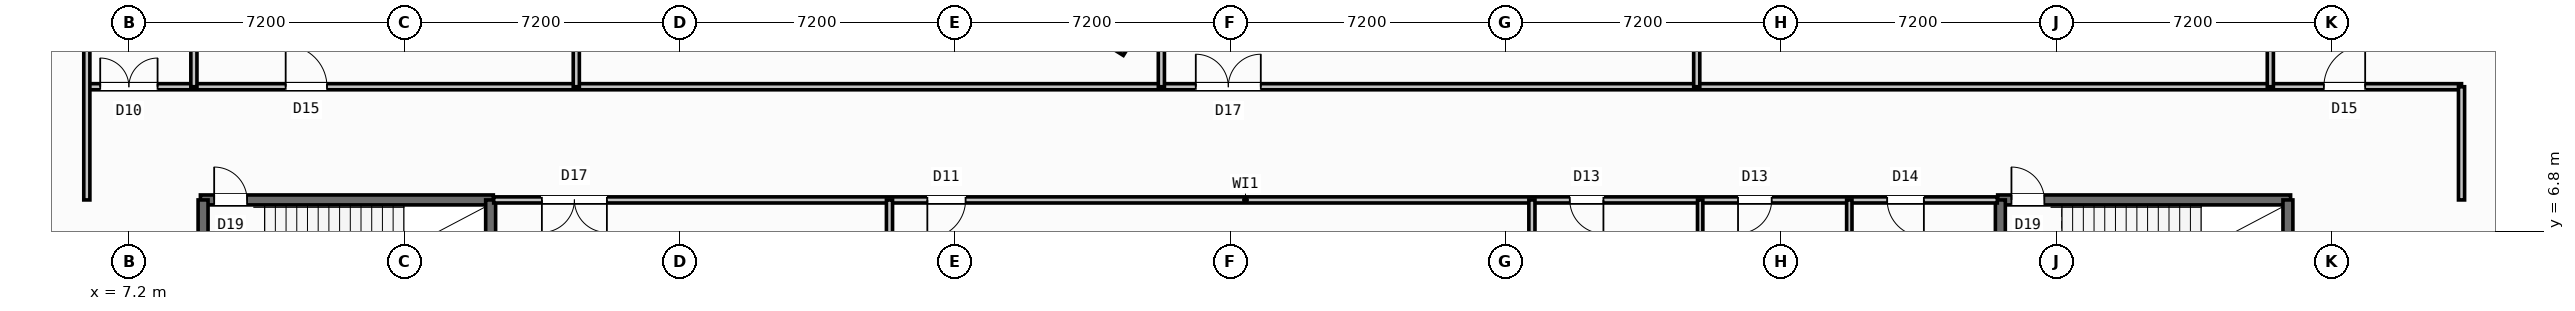
"""IFC4 building model, lengths in metres.
Left out: names, types, materials, properties, quantities, classifications, styles, units other than length and angle.
Written with IfcOpenShell. Run it as: python <this file> out.ifc"""

import sys

from ifc_helpers import new_model, si_unit, direction, frame, frame_2d, origin, origin_2d, place, context, subcontext, project, spatial, rectangle, hollow_rectangle, extrude, source, transform, mapped, element, fill, save


model = new_model("IFC4")
c1 = context("Model", 3, precision=1e-05, world=origin(), true_north=direction((0.0, 1.0)))
c2 = subcontext(c1, "Body", "Model", "MODEL_VIEW")
j1 = project(units=[si_unit("LENGTHUNIT", "METRE"), si_unit("PLANEANGLEUNIT", "RADIAN")], contexts=[c1])
p1 = place(None, origin())
s1 = spatial("IfcSite", under=j1, at=p1, CompositionType="ELEMENT")
p2 = place(p1, origin())
s2 = spatial("IfcBuilding", under=s1, at=p2, CompositionType="ELEMENT")
p3 = place(p2, frame((0.0, 0.0, 5.4)))
s3 = spatial("IfcBuildingStorey", under=s2, at=p3, CompositionType="ELEMENT", Elevation=5.4)
m1 = source(origin(), c2, "Body", "SweptSolid", [
    extrude(hollow_rectangle(XDim=1.0, YDim=1.0, WallThickness=0.04, at=origin_2d()), origin(), (0.0, 0.0, 1.0), 4.8),
])
p4 = place(p3, frame((33.046, 12.087, 0.0), z_axis=(0.0, 0.0, 1.0), x_axis=(-0.848048096156, 0.529919264233, 0.0)))
e1 = element("IfcColumn", 1, at=p4, inside=s3, PredefinedType="COLUMN", context=c2, shape_type="MappedRepresentation", body=[
    mapped(m1, transform((0.0, 0.0, 0.0), scale=1.0)),
])
p5 = place(p3, frame((9.07, 7.62, 0.0), z_axis=(0.0, 0.0, 1.0), x_axis=(1.0, 0.0, 0.0)))
e2 = element("IfcWall", 2, at=p5, inside=s3, PredefinedType="SHEAR", context=c2, shape_type="SweptSolid", body=[
    extrude(rectangle(XDim=7.66, YDim=0.26, at=frame_2d((3.83, 0.0))), origin(), (0.0, 0.0, 1.0), 4.6),
])
p6 = place(p5, frame((0.36, 0.0, 0.0)))
e3 = element("IfcOpeningElement", 3, at=p6, cuts=e2, PredefinedType="OPENING", context=c2, shape_type="SweptSolid", body=[
    extrude(rectangle(XDim=0.86, YDim=2.05, at=frame_2d((0.43, 1.025))), frame((0.0, 0.14, 0.0), z_axis=(0.0, -1.0, 0.0), x_axis=(1.0, 0.0, 0.0)), (0.0, 0.0, 1.0), 0.28),
])
for number, where, z_axis, x_axis in (
    (4, (9.14, 4.26, 0.0), (0.0, 0.0, 1.0), (0.0, 1.0, 0.0)),
    (5, (16.66, 4.26, 0.0), (0.0, 0.0, 1.0), (0.0, 1.0, 0.0)),
):
    element("IfcWall", number, at=place(p3, frame(where, z_axis=z_axis, x_axis=x_axis)), inside=s3, PredefinedType="SHEAR", context=c2, shape_type="SweptSolid", body=[
        extrude(rectangle(XDim=3.36, YDim=0.26, at=frame_2d((1.68, 0.0))), origin(), (0.0, 0.0, 1.0), 4.6),
    ])
p7 = place(p3, frame((56.07, 7.62, 0.0), z_axis=(0.0, 0.0, 1.0), x_axis=(1.0, 0.0, 0.0)))
e6 = element("IfcWall", 6, at=p7, inside=s3, PredefinedType="SHEAR", context=c2, shape_type="SweptSolid", body=[
    extrude(rectangle(XDim=7.66, YDim=0.26, at=frame_2d((3.83, 0.0))), origin(), (0.0, 0.0, 1.0), 4.6),
])
p8 = place(p7, frame((0.36, 0.0, 0.0)))
e7 = element("IfcOpeningElement", 7, at=p8, cuts=e6, PredefinedType="OPENING", context=c2, shape_type="SweptSolid", body=[
    extrude(rectangle(XDim=0.86, YDim=2.05, at=frame_2d((0.43, 1.025))), frame((0.0, 0.14, 0.0), z_axis=(0.0, -1.0, 0.0), x_axis=(1.0, 0.0, 0.0)), (0.0, 0.0, 1.0), 0.28),
])
for number, where, z_axis, x_axis in (
    (8, (56.14, 4.26, 0.0), (0.0, 0.0, 1.0), (0.0, 1.0, 0.0)),
    (9, (63.66, 4.26, 0.0), (0.0, 0.0, 1.0), (0.0, 1.0, 0.0)),
):
    element("IfcWall", number, at=place(p3, frame(where, z_axis=z_axis, x_axis=x_axis)), inside=s3, PredefinedType="SHEAR", context=c2, shape_type="SweptSolid", body=[
        extrude(rectangle(XDim=3.36, YDim=0.26, at=frame_2d((1.68, 0.0))), origin(), (0.0, 0.0, 1.0), 4.6),
    ])
p9 = place(p3, frame((6.1, 10.58, 0.0), z_axis=(0.0, 0.0, 1.0), x_axis=(1.0, 0.0, 0.0)))
e10 = element("IfcWall", 10, at=p9, inside=s3, PredefinedType="PARTITIONING", context=c2, shape_type="SweptSolid", body=[
    extrude(rectangle(XDim=62.1, YDim=0.16, at=frame_2d((31.05, 0.0))), origin(), (0.0, 0.0, 1.0), 4.44),
])
p10 = place(p9, frame((29.0, 0.0, 0.0)))
e11 = element("IfcOpeningElement", 11, at=p10, cuts=e10, PredefinedType="OPENING", context=c2, shape_type="SweptSolid", body=[
    extrude(rectangle(XDim=1.7, YDim=2.2, at=frame_2d((0.85, 1.1))), frame((0.0, 0.09, 0.0), z_axis=(0.0, -1.0, 0.0), x_axis=(1.0, 0.0, 0.0)), (0.0, 0.0, 1.0), 0.18),
])
p11 = place(p9, frame((0.35, 0.0, 0.0)))
e12 = element("IfcOpeningElement", 12, at=p11, cuts=e10, PredefinedType="OPENING", context=c2, shape_type="SweptSolid", body=[
    extrude(rectangle(XDim=1.5, YDim=2.15, at=frame_2d((0.75, 1.075))), frame((0.0, 0.09, 0.0), z_axis=(0.0, -1.0, 0.0), x_axis=(1.0, 0.0, 0.0)), (0.0, 0.0, 1.0), 0.18),
])
p12 = place(p9, frame((5.2, 0.0, 0.0)))
e13 = element("IfcOpeningElement", 13, at=p12, cuts=e10, PredefinedType="OPENING", context=c2, shape_type="SweptSolid", body=[
    extrude(rectangle(XDim=1.08, YDim=2.15, at=frame_2d((0.54, 1.075))), frame((0.0, 0.09, 0.0), z_axis=(0.0, -1.0, 0.0), x_axis=(1.0, 0.0, 0.0)), (0.0, 0.0, 1.0), 0.18),
])
p13 = place(p9, frame((58.5, 0.0, 0.0)))
e14 = element("IfcOpeningElement", 14, at=p13, cuts=e10, PredefinedType="OPENING", context=c2, shape_type="SweptSolid", body=[
    extrude(rectangle(XDim=1.08, YDim=2.15, at=frame_2d((0.54, 1.075))), frame((0.0, 0.09, 0.0), z_axis=(0.0, -1.0, 0.0), x_axis=(1.0, 0.0, 0.0)), (0.0, 0.0, 1.0), 0.18),
])
p14 = place(p3, frame((16.74, 7.62, 0.0), z_axis=(0.0, 0.0, 1.0), x_axis=(1.0, 0.0, 0.0)))
e15 = element("IfcWall", 15, at=p14, inside=s3, PredefinedType="PARTITIONING", context=c2, shape_type="SweptSolid", body=[
    extrude(rectangle(XDim=39.32, YDim=0.16, at=frame_2d((19.66, 0.0))), origin(), (0.0, 0.0, 1.0), 4.44),
])
p15 = place(p14, frame((1.26, 0.0, 0.0)))
e16 = element("IfcOpeningElement", 16, at=p15, cuts=e15, PredefinedType="OPENING", context=c2, shape_type="SweptSolid", body=[
    extrude(rectangle(XDim=1.7, YDim=2.2, at=frame_2d((0.85, 1.1))), frame((0.0, 0.09, 0.0), z_axis=(0.0, -1.0, 0.0), x_axis=(1.0, 0.0, 0.0)), (0.0, 0.0, 1.0), 0.18),
])
p16 = place(p14, frame((11.34, 0.0, 0.0)))
e17 = element("IfcOpeningElement", 17, at=p16, cuts=e15, PredefinedType="OPENING", context=c2, shape_type="SweptSolid", body=[
    extrude(rectangle(XDim=1.0, YDim=2.1, at=frame_2d((0.5, 1.05))), frame((0.0, 0.09, 0.0), z_axis=(0.0, -1.0, 0.0), x_axis=(1.0, 0.0, 0.0)), (0.0, 0.0, 1.0), 0.18),
])
p17 = place(p14, frame((28.14, 0.0, 0.0)))
e18 = element("IfcOpeningElement", 18, at=p17, cuts=e15, PredefinedType="OPENING", context=c2, shape_type="SweptSolid", body=[
    extrude(rectangle(XDim=0.88, YDim=2.08, at=frame_2d((0.44, 1.04))), frame((0.0, 0.09, 0.0), z_axis=(0.0, -1.0, 0.0), x_axis=(1.0, 0.0, 0.0)), (0.0, 0.0, 1.0), 0.18),
])
p18 = place(p14, frame((32.54, 0.0, 0.0)))
e19 = element("IfcOpeningElement", 19, at=p18, cuts=e15, PredefinedType="OPENING", context=c2, shape_type="SweptSolid", body=[
    extrude(rectangle(XDim=0.88, YDim=2.08, at=frame_2d((0.44, 1.04))), frame((0.0, 0.09, 0.0), z_axis=(0.0, -1.0, 0.0), x_axis=(1.0, 0.0, 0.0)), (0.0, 0.0, 1.0), 0.18),
])
p19 = place(p14, frame((36.44, 0.0, 0.0)))
e20 = element("IfcOpeningElement", 20, at=p19, cuts=e15, PredefinedType="OPENING", context=c2, shape_type="SweptSolid", body=[
    extrude(rectangle(XDim=0.96, YDim=2.08, at=frame_2d((0.48, 1.04))), frame((0.0, 0.09, 0.0), z_axis=(0.0, -1.0, 0.0), x_axis=(1.0, 0.0, 0.0)), (0.0, 0.0, 1.0), 0.18),
])
p20 = place(p3, frame((34.2, 10.58, 0.0), z_axis=(0.0, 0.0, 1.0), x_axis=(0.0, 1.0, 0.0)))
e21 = element("IfcWall", 21, at=p20, inside=s3, PredefinedType="PARTITIONING", context=c2, shape_type="SweptSolid", body=[
    extrude(rectangle(XDim=3.085, YDim=0.16, at=frame_2d((1.543, 0.0))), origin(), (0.0, 0.0, 1.0), 4.44),
])
p21 = place(p3, frame((48.2, 10.58, 0.0), z_axis=(0.0, 0.0, 1.0), x_axis=(0.0, 1.0, 0.0)))
e22 = element("IfcWall", 22, at=p21, inside=s3, PredefinedType="PARTITIONING", context=c2, shape_type="SweptSolid", body=[
    extrude(rectangle(XDim=5.22, YDim=0.16, at=frame_2d((2.61, 0.0))), origin(), (0.0, 0.0, 1.0), 4.44),
])
for number, where, z_axis, x_axis in (
    (23, (27.09, 1.6, 0.0), (0.0, 0.0, 1.0), (0.0, 1.0, 0.0)),
    (24, (43.89, 1.6, 0.0), (0.0, 0.0, 1.0), (0.0, 1.0, 0.0)),
):
    element("IfcWall", number, at=place(p3, frame(where, z_axis=z_axis, x_axis=x_axis)), inside=s3, PredefinedType="PARTITIONING", context=c2, shape_type="SweptSolid", body=[
        extrude(rectangle(XDim=6.02, YDim=0.16, at=frame_2d((3.01, 0.0))), origin(), (0.0, 0.0, 1.0), 4.44),
    ])
for number, where, z_axis, x_axis in (
    (25, (48.29, 1.6, 0.0), (0.0, 0.0, 1.0), (0.0, 1.0, 0.0)),
    (26, (52.19, 1.6, 0.0), (0.0, 0.0, 1.0), (0.0, 1.0, 0.0)),
):
    element("IfcWall", number, at=place(p3, frame(where, z_axis=z_axis, x_axis=x_axis)), inside=s3, PredefinedType="PLUMBINGWALL", context=c2, shape_type="SweptSolid", body=[
        extrude(rectangle(XDim=6.02, YDim=0.14, at=frame_2d((3.01, 0.0))), origin(), (0.0, 0.0, 1.0), 4.44),
    ])
p22 = place(p3, frame((6.1, 7.62, 0.0), z_axis=(0.0, 0.0, 1.0), x_axis=(0.0, 1.0, 0.0)))
e27 = element("IfcWall", 27, at=p22, inside=s3, PredefinedType="PARTITIONING", context=c2, shape_type="SweptSolid", body=[
    extrude(rectangle(XDim=20.689, YDim=0.16, at=frame_2d((10.344, 0.0))), origin(), (0.0, 0.0, 1.0), 4.44),
])
for number, where, z_axis, x_axis in (
    (28, (8.9, 10.58, 0.0), (0.0, 0.0, 1.0), (0.0, 1.0, 0.0)),
    (29, (18.9, 10.58, 0.0), (0.0, 0.0, 1.0), (0.0, 1.0, 0.0)),
):
    element("IfcWall", number, at=place(p3, frame(where, z_axis=z_axis, x_axis=x_axis)), inside=s3, PredefinedType="PARTITIONING", context=c2, shape_type="SweptSolid", body=[
        extrude(rectangle(XDim=24.57, YDim=0.16, at=frame_2d((12.285, 0.0))), origin(), (0.0, 0.0, 1.0), 4.44),
    ])
p23 = place(p3, frame((63.2, 10.58, 0.0), z_axis=(0.0, 0.0, 1.0), x_axis=(0.0, 1.0, 0.0)))
e30 = element("IfcWall", 30, at=p23, inside=s3, PredefinedType="PARTITIONING", context=c2, shape_type="SweptSolid", body=[
    extrude(rectangle(XDim=18.159, YDim=0.16, at=frame_2d((9.08, 0.0))), origin(), (0.0, 0.0, 1.0), 4.44),
])
p24 = place(p3, frame((68.2, 7.62, 0.0), z_axis=(0.0, 0.0, 1.0), x_axis=(0.0, 1.0, 0.0)))
e31 = element("IfcWall", 31, at=p24, inside=s3, PredefinedType="PARTITIONING", context=c2, shape_type="SweptSolid", body=[
    extrude(rectangle(XDim=2.96, YDim=0.16, at=frame_2d((1.48, 0.0))), origin(), (0.0, 0.0, 1.0), 4.44),
])
m2 = source(origin(), c2, "Body", "SweptSolid", [
    extrude(rectangle(XDim=0.86, YDim=2.05, at=frame_2d((0.43, 1.025))), frame((0.0, 0.025, 0.0), z_axis=(0.0, -1.0, 0.0), x_axis=(1.0, 0.0, 0.0)), (0.0, 0.0, 1.0), 0.05),
])
p25 = place(p6, origin())
e32 = element("IfcDoor", 32, at=p25, inside=s3, OperationType="SINGLE_SWING_LEFT", PredefinedType="DOOR", context=c2, shape_type="MappedRepresentation", body=[
    mapped(m2, transform((0.0, 0.0, 0.0), scale=1.0)),
])
fill(e3, e32)
p26 = place(p8, origin())
e33 = element("IfcDoor", 33, at=p26, inside=s3, OperationType="SINGLE_SWING_LEFT", PredefinedType="DOOR", context=c2, shape_type="MappedRepresentation", body=[
    mapped(m2, transform((0.0, 0.0, 0.0), scale=1.0)),
])
fill(e7, e33)
m3 = source(origin(), c2, "Body", "SweptSolid", [
    extrude(rectangle(XDim=1.7, YDim=2.2, at=frame_2d((0.85, 1.1))), frame((0.0, 0.025, 0.0), z_axis=(0.0, -1.0, 0.0), x_axis=(1.0, 0.0, 0.0)), (0.0, 0.0, 1.0), 0.05),
])
p27 = place(p10, origin())
e34 = element("IfcDoor", 34, at=p27, inside=s3, OperationType="DOUBLE_DOOR_SINGLE_SWING", PredefinedType="DOOR", context=c2, shape_type="MappedRepresentation", body=[
    mapped(m3, transform((0.0, 0.0, 0.0), scale=1.0)),
])
fill(e11, e34)
p28 = place(p15, frame((1.7, 0.0, 0.0), z_axis=(0.0, 0.0, 1.0), x_axis=(-1.0, 0.0, 0.0)))
e35 = element("IfcDoor", 35, at=p28, inside=s3, OperationType="DOUBLE_DOOR_SINGLE_SWING", PredefinedType="DOOR", context=c2, shape_type="MappedRepresentation", body=[
    mapped(m3, transform((0.0, 0.0, 0.0), scale=1.0)),
])
fill(e16, e35)
m4 = source(origin(), c2, "Body", "SweptSolid", [
    extrude(rectangle(XDim=1.0, YDim=2.1, at=frame_2d((0.5, 1.05))), frame((0.0, 0.025, 0.0), z_axis=(0.0, -1.0, 0.0), x_axis=(1.0, 0.0, 0.0)), (0.0, 0.0, 1.0), 0.05),
])
p29 = place(p16, frame((1.0, 0.0, 0.0), z_axis=(0.0, 0.0, 1.0), x_axis=(-1.0, 0.0, 0.0)))
e36 = element("IfcDoor", 36, at=p29, inside=s3, OperationType="SINGLE_SWING_RIGHT", PredefinedType="DOOR", context=c2, shape_type="MappedRepresentation", body=[
    mapped(m4, transform((0.0, 0.0, 0.0), scale=1.0)),
])
fill(e17, e36)
m5 = source(origin(), c2, "Body", "SweptSolid", [
    extrude(rectangle(XDim=0.88, YDim=2.08, at=frame_2d((0.44, 1.04))), frame((0.0, 0.025, 0.0), z_axis=(0.0, -1.0, 0.0), x_axis=(1.0, 0.0, 0.0)), (0.0, 0.0, 1.0), 0.05),
])
p30 = place(p17, frame((0.88, 0.0, 0.0), z_axis=(0.0, 0.0, 1.0), x_axis=(-1.0, 0.0, 0.0)))
e37 = element("IfcDoor", 37, at=p30, inside=s3, OperationType="SINGLE_SWING_LEFT", PredefinedType="DOOR", context=c2, shape_type="MappedRepresentation", body=[
    mapped(m5, transform((0.0, 0.0, 0.0), scale=1.0)),
])
fill(e18, e37)
p31 = place(p18, frame((0.88, 0.0, 0.0), z_axis=(0.0, 0.0, 1.0), x_axis=(-1.0, 0.0, 0.0)))
e38 = element("IfcDoor", 38, at=p31, inside=s3, OperationType="SINGLE_SWING_RIGHT", PredefinedType="DOOR", context=c2, shape_type="MappedRepresentation", body=[
    mapped(m5, transform((0.0, 0.0, 0.0), scale=1.0)),
])
fill(e19, e38)
m6 = source(origin(), c2, "Body", "SweptSolid", [
    extrude(rectangle(XDim=0.96, YDim=2.08, at=frame_2d((0.48, 1.04))), frame((0.0, 0.025, 0.0), z_axis=(0.0, -1.0, 0.0), x_axis=(1.0, 0.0, 0.0)), (0.0, 0.0, 1.0), 0.05),
])
p32 = place(p19, frame((0.96, 0.0, 0.0), z_axis=(0.0, 0.0, 1.0), x_axis=(-1.0, 0.0, 0.0)))
e39 = element("IfcDoor", 39, at=p32, inside=s3, OperationType="SINGLE_SWING_LEFT", PredefinedType="DOOR", context=c2, shape_type="MappedRepresentation", body=[
    mapped(m6, transform((0.0, 0.0, 0.0), scale=1.0)),
])
fill(e20, e39)
m7 = source(origin(), c2, "Body", "SweptSolid", [
    extrude(rectangle(XDim=1.5, YDim=2.15, at=frame_2d((0.75, 1.075))), frame((0.0, 0.025, 0.0), z_axis=(0.0, -1.0, 0.0), x_axis=(1.0, 0.0, 0.0)), (0.0, 0.0, 1.0), 0.05),
])
p33 = place(p11, origin())
e40 = element("IfcDoor", 40, at=p33, inside=s3, OperationType="DOUBLE_DOOR_SINGLE_SWING", PredefinedType="DOOR", context=c2, shape_type="MappedRepresentation", body=[
    mapped(m7, transform((0.0, 0.0, 0.0), scale=1.0)),
])
fill(e12, e40)
m8 = source(origin(), c2, "Body", "SweptSolid", [
    extrude(rectangle(XDim=1.08, YDim=2.15, at=frame_2d((0.54, 1.075))), frame((0.0, 0.025, 0.0), z_axis=(0.0, -1.0, 0.0), x_axis=(1.0, 0.0, 0.0)), (0.0, 0.0, 1.0), 0.05),
])
p34 = place(p12, origin())
e41 = element("IfcDoor", 41, at=p34, inside=s3, OperationType="SINGLE_SWING_LEFT", PredefinedType="DOOR", context=c2, shape_type="MappedRepresentation", body=[
    mapped(m8, transform((0.0, 0.0, 0.0), scale=1.0)),
])
fill(e13, e41)
p35 = place(p13, origin())
e42 = element("IfcDoor", 42, at=p35, inside=s3, OperationType="SINGLE_SWING_RIGHT", PredefinedType="DOOR", context=c2, shape_type="MappedRepresentation", body=[
    mapped(m8, transform((0.0, 0.0, 0.0), scale=1.0)),
])
fill(e14, e42)
save(model, sys.argv[1])
